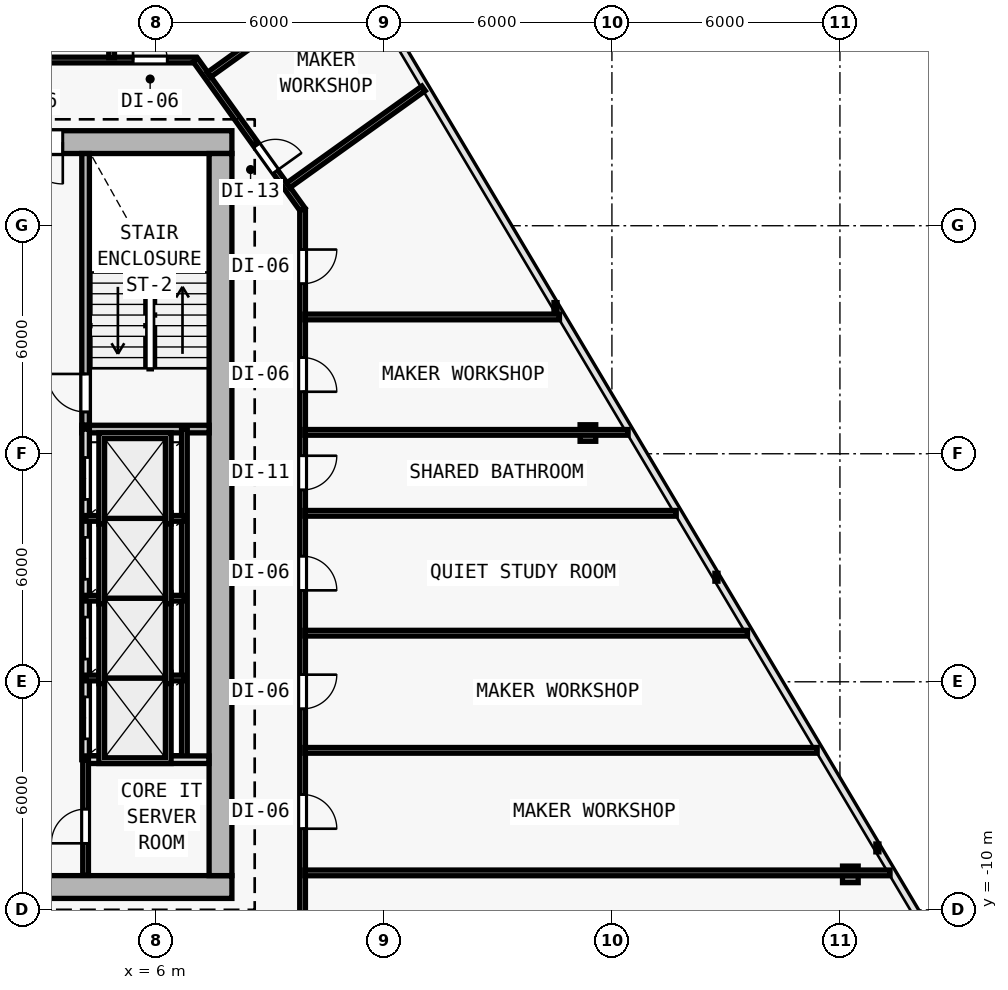
"""IFC4 building model, lengths in metres.
Left out: names, types, materials, properties, quantities, classifications, styles, units other than length and angle.
Written with IfcOpenShell. Run it as: python <this file> out.ifc"""

import sys

from ifc_helpers import new_model, si_unit, direction, frame, frame_2d, origin, origin_2d, place, context, subcontext, project, spatial, rectangle, i_section, extrude, element, fill, save


model = new_model("IFC4")
c1 = context("Model", 3, precision=1e-05, world=origin(), true_north=direction((0.0, 1.0)))
c2 = subcontext(c1, "Body", "Model", "MODEL_VIEW")
j1 = project(units=[si_unit("LENGTHUNIT", "METRE"), si_unit("PLANEANGLEUNIT", "RADIAN")], contexts=[c1])
p1 = place(None, origin())
s1 = spatial("IfcSite", under=j1, at=p1, CompositionType="ELEMENT")
p2 = place(p1, origin())
s2 = spatial("IfcBuilding", under=s1, at=p2, CompositionType="ELEMENT")
p3 = place(p2, frame((0.0, 0.0, 62.4)))
s3 = spatial("IfcBuildingStorey", under=s2, at=p3, CompositionType="ELEMENT", Elevation=62.4)
for number, where, z_axis, x_axis in (
    (1, (7.7, -9.4, 0.0), (0.0, 0.0, 1.0), (1.0, 0.0, 0.0)),
    (2, (7.7, 10.2, 0.0), (0.0, 0.0, 1.0), (1.0, 0.0, 0.0)),
    (3, (7.7, 0.4, 0.0), (0.0, 0.0, 1.0), (1.0, 0.0, 0.0)),
):
    element("IfcColumn", number, at=place(p3, frame(where, z_axis=z_axis, x_axis=x_axis)), inside=s3, PredefinedType="COLUMN", context=c2, shape_type="SweptSolid", body=[
        extrude(i_section(OverallWidth=0.416, OverallDepth=0.446, WebThickness=0.025, FlangeThickness=0.04, FilletRadius=0.015, at=origin_2d()), origin(), (0.0, 0.0, 1.0), 3.6),
    ])
p4 = place(p3, frame((24.274, -9.067, 0.006), z_axis=(-0.026039494941, 0.021620259507, 0.999427090428), x_axis=(-0.638800249892, -0.769372628015, 0.0)))
e4 = element("IfcColumn", 4, at=p4, inside=s3, PredefinedType="COLUMN", context=c2, shape_type="SweptSolid", body=[
    extrude(i_section(OverallWidth=0.412, OverallDepth=0.435, WebThickness=0.023, FlangeThickness=0.037, FilletRadius=0.015, at=origin_2d()), origin(), (0.0, 0.0, 1.0), 3.591),
])
p5 = place(p3, frame((17.368, 2.546, 0.006), z_axis=(-0.018907326549, 0.00952167524, 0.999775900241), x_axis=(-0.449781931574, -0.893138406984, 0.0)))
e5 = element("IfcColumn", 5, at=p5, inside=s3, PredefinedType="COLUMN", context=c2, shape_type="SweptSolid", body=[
    extrude(i_section(OverallWidth=0.412, OverallDepth=0.435, WebThickness=0.023, FlangeThickness=0.037, FilletRadius=0.015, at=origin_2d()), origin(), (0.0, 0.0, 1.0), 3.59),
])
p6 = place(p3, frame((-8.0, -9.4, 0.0), z_axis=(0.0, 0.0, 1.0), x_axis=(1.0, 0.0, 0.0)))
e6 = element("IfcWall", 6, at=p6, inside=s3, PredefinedType="SHEAR", context=c2, shape_type="SweptSolid", body=[
    extrude(rectangle(XDim=16.0, YDim=0.6, at=frame_2d((8.0, 0.0))), origin(), (0.0, 0.0, 1.0), 3.35),
])
p7 = place(p6, frame((9.65, 0.0, 0.0)))
e7 = element("IfcOpeningElement", 7, at=p7, cuts=e6, PredefinedType="OPENING", context=c2, shape_type="SweptSolid", body=[
    extrude(rectangle(XDim=1.5, YDim=2.2, at=frame_2d((0.75, 1.1))), frame((0.0, 0.31, 0.0), z_axis=(0.0, -1.0, 0.0), x_axis=(1.0, 0.0, 0.0)), (0.0, 0.0, 1.0), 0.62),
])
p8 = place(p3, frame((8.0, 10.2, 0.0), z_axis=(0.0, 0.0, 1.0), x_axis=(-1.0, 0.0, 0.0)))
e8 = element("IfcWall", 8, at=p8, inside=s3, PredefinedType="SHEAR", context=c2, shape_type="SweptSolid", body=[
    extrude(rectangle(XDim=16.0, YDim=0.6, at=frame_2d((8.0, 0.0))), origin(), (0.0, 0.0, 1.0), 3.35),
])
p9 = place(p8, frame((4.45, 0.0, 0.0)))
e9 = element("IfcOpeningElement", 9, at=p9, cuts=e8, PredefinedType="OPENING", context=c2, shape_type="SweptSolid", body=[
    extrude(rectangle(XDim=1.1, YDim=2.15, at=frame_2d((0.55, 1.075))), frame((0.0, 0.31, 0.0), z_axis=(0.0, -1.0, 0.0), x_axis=(1.0, 0.0, 0.0)), (0.0, 0.0, 1.0), 0.62),
])
p10 = place(p3, frame((7.7, 9.9, 0.0), z_axis=(0.0, 0.0, 1.0), x_axis=(0.0, -1.0, 0.0)))
e10 = element("IfcWall", 10, at=p10, inside=s3, PredefinedType="SHEAR", context=c2, shape_type="SweptSolid", body=[
    extrude(rectangle(XDim=19.0, YDim=0.6, at=frame_2d((9.5, 0.0))), origin(), (0.0, 0.0, 1.0), 3.35),
])
p11 = place(p3, frame((4.15, 2.75, 0.0), z_axis=(0.0, 0.0, 1.0), x_axis=(0.0, 1.0, 0.0)))
e11 = element("IfcWall", 11, at=p11, inside=s3, PredefinedType="SOLIDWALL", context=c2, shape_type="SweptSolid", body=[
    extrude(rectangle(XDim=7.15, YDim=0.2, at=frame_2d((3.575, 0.0))), origin(), (0.0, 0.0, 1.0), 3.35),
])
p12 = place(p11, frame((0.35, 0.0, 0.0)))
e12 = element("IfcOpeningElement", 12, at=p12, cuts=e11, PredefinedType="OPENING", context=c2, shape_type="SweptSolid", body=[
    extrude(rectangle(XDim=1.0, YDim=2.15, at=frame_2d((0.5, 1.075))), frame((0.0, 0.11, 0.0), z_axis=(0.0, -1.0, 0.0), x_axis=(1.0, 0.0, 0.0)), (0.0, 0.0, 1.0), 0.22),
])
p13 = place(p3, frame((4.05, 2.65, 0.0), z_axis=(0.0, 0.0, 1.0), x_axis=(1.0, 0.0, 0.0)))
e13 = element("IfcWall", 13, at=p13, inside=s3, PredefinedType="SOLIDWALL", context=c2, shape_type="SweptSolid", body=[
    extrude(rectangle(XDim=3.35, YDim=0.2, at=frame_2d((1.675, 0.0))), origin(), (0.0, 0.0, 1.0), 3.35),
])
p14 = place(p3, frame((4.15, -6.05, 0.0), z_axis=(0.0, 0.0, 1.0), x_axis=(0.0, 1.0, 0.0)))
e14 = element("IfcWall", 14, at=p14, inside=s3, PredefinedType="SOLIDWALL", context=c2, shape_type="SweptSolid", body=[
    extrude(rectangle(XDim=8.7, YDim=0.2, at=frame_2d((4.35, 0.0))), origin(), (0.0, 0.0, 1.0), 3.35),
])
p15 = place(p14, frame((0.55, 0.0, 0.0)))
e15 = element("IfcOpeningElement", 15, at=p15, cuts=e14, PredefinedType="OPENING", context=c2, shape_type="SweptSolid", body=[
    extrude(rectangle(XDim=1.1, YDim=2.15, at=frame_2d((0.55, 1.075))), frame((0.0, 0.11, 0.0), z_axis=(0.0, -1.0, 0.0), x_axis=(1.0, 0.0, 0.0)), (0.0, 0.0, 1.0), 0.22),
])
p16 = place(p14, frame((2.65, 0.0, 0.0)))
e16 = element("IfcOpeningElement", 16, at=p16, cuts=e14, PredefinedType="OPENING", context=c2, shape_type="SweptSolid", body=[
    extrude(rectangle(XDim=1.1, YDim=2.15, at=frame_2d((0.55, 1.075))), frame((0.0, 0.11, 0.0), z_axis=(0.0, -1.0, 0.0), x_axis=(1.0, 0.0, 0.0)), (0.0, 0.0, 1.0), 0.22),
])
p17 = place(p14, frame((4.75, 0.0, 0.0)))
e17 = element("IfcOpeningElement", 17, at=p17, cuts=e14, PredefinedType="OPENING", context=c2, shape_type="SweptSolid", body=[
    extrude(rectangle(XDim=1.1, YDim=2.15, at=frame_2d((0.55, 1.075))), frame((0.0, 0.11, 0.0), z_axis=(0.0, -1.0, 0.0), x_axis=(1.0, 0.0, 0.0)), (0.0, 0.0, 1.0), 0.22),
])
p18 = place(p14, frame((6.85, 0.0, 0.0)))
e18 = element("IfcOpeningElement", 18, at=p18, cuts=e14, PredefinedType="OPENING", context=c2, shape_type="SweptSolid", body=[
    extrude(rectangle(XDim=1.1, YDim=2.15, at=frame_2d((0.55, 1.075))), frame((0.0, 0.11, 0.0), z_axis=(0.0, -1.0, 0.0), x_axis=(1.0, 0.0, 0.0)), (0.0, 0.0, 1.0), 0.22),
])
p19 = place(p3, frame((6.75, -6.05, 0.0), z_axis=(0.0, 0.0, 1.0), x_axis=(0.0, 1.0, 0.0)))
e19 = element("IfcWall", 19, at=p19, inside=s3, PredefinedType="PARTITIONING", context=c2, shape_type="SweptSolid", body=[
    extrude(rectangle(XDim=8.7, YDim=0.15, at=frame_2d((4.35, 0.0))), origin(), (0.0, 0.0, 1.0), 3.35),
])
for number, where, z_axis, x_axis in (
    (20, (4.15, -3.9, 0.0), (0.0, 0.0, 1.0), (1.0, 0.0, 0.0)),
    (21, (4.15, -1.8, 0.0), (0.0, 0.0, 1.0), (1.0, 0.0, 0.0)),
    (22, (4.15, 0.3, 0.0), (0.0, 0.0, 1.0), (1.0, 0.0, 0.0)),
):
    element("IfcWall", number, at=place(p3, frame(where, z_axis=z_axis, x_axis=x_axis)), inside=s3, PredefinedType="PARTITIONING", context=c2, shape_type="SweptSolid", body=[
        extrude(rectangle(XDim=2.6, YDim=0.15, at=frame_2d((1.3, 0.0))), origin(), (0.0, 0.0, 1.0), 3.35),
    ])
p20 = place(p3, frame((4.15, -6.05, 0.0), z_axis=(0.0, 0.0, 1.0), x_axis=(1.0, 0.0, 0.0)))
e23 = element("IfcWall", 23, at=p20, inside=s3, PredefinedType="SOLIDWALL", context=c2, shape_type="SweptSolid", body=[
    extrude(rectangle(XDim=3.245, YDim=0.2, at=frame_2d((1.623, 0.0))), origin(), (0.0, 0.0, 1.0), 3.35),
])
p21 = place(p3, frame((4.15, -9.095, 0.0), z_axis=(0.0, 0.0, 1.0), x_axis=(0.0, 1.0, 0.0)))
e24 = element("IfcWall", 24, at=p21, inside=s3, PredefinedType="PARTITIONING", context=c2, shape_type="SweptSolid", body=[
    extrude(rectangle(XDim=3.045, YDim=0.15, at=frame_2d((1.522, 0.0))), origin(), (0.0, 0.0, 1.0), 3.35),
])
p22 = place(p21, frame((0.845, 0.0, 0.0)))
e25 = element("IfcOpeningElement", 25, at=p22, cuts=e24, PredefinedType="OPENING", context=c2, shape_type="SweptSolid", body=[
    extrude(rectangle(XDim=0.9, YDim=2.1, at=frame_2d((0.45, 1.05))), frame((0.0, 0.085, 0.0), z_axis=(0.0, -1.0, 0.0), x_axis=(1.0, 0.0, 0.0)), (0.0, 0.0, 1.0), 0.17),
])
p23 = place(p3, frame((-7.041, 12.36, 0.0), z_axis=(0.0, 0.0, 1.0), x_axis=(1.0, 0.0, 0.0)))
e26 = element("IfcWall", 26, at=p23, inside=s3, PredefinedType="PARTITIONING", context=c2, shape_type="SweptSolid", body=[
    extrude(rectangle(XDim=14.082, YDim=0.15, at=frame_2d((7.041, 0.0))), origin(), (0.0, 0.0, 1.0), 3.35),
])
p24 = place(p23, frame((12.44, 0.0, 0.0)))
e27 = element("IfcOpeningElement", 27, at=p24, cuts=e26, PredefinedType="OPENING", context=c2, shape_type="SweptSolid", body=[
    extrude(rectangle(XDim=0.9, YDim=2.1, at=frame_2d((0.45, 1.05))), frame((0.0, 0.085, 0.0), z_axis=(0.0, -1.0, 0.0), x_axis=(1.0, 0.0, 0.0)), (0.0, 0.0, 1.0), 0.17),
])
p25 = place(p23, frame((9.225, 0.0, 0.0)))
e28 = element("IfcOpeningElement", 28, at=p25, cuts=e26, PredefinedType="OPENING", context=c2, shape_type="SweptSolid", body=[
    extrude(rectangle(XDim=0.9, YDim=2.1, at=frame_2d((0.45, 1.05))), frame((0.0, 0.085, 0.0), z_axis=(0.0, -1.0, 0.0), x_axis=(1.0, 0.0, 0.0)), (0.0, 0.0, 1.0), 0.17),
])
p26 = place(p23, frame((4.866, 0.0, 0.0)))
e29 = element("IfcOpeningElement", 29, at=p26, cuts=e26, PredefinedType="OPENING", context=c2, shape_type="SweptSolid", body=[
    extrude(rectangle(XDim=0.9, YDim=2.1, at=frame_2d((0.45, 1.05))), frame((0.0, 0.085, 0.0), z_axis=(0.0, -1.0, 0.0), x_axis=(1.0, 0.0, 0.0)), (0.0, 0.0, 1.0), 0.17),
])
p27 = place(p23, frame((1.218, 0.0, 0.0)))
e30 = element("IfcOpeningElement", 30, at=p27, cuts=e26, PredefinedType="OPENING", context=c2, shape_type="SweptSolid", body=[
    extrude(rectangle(XDim=0.9, YDim=2.1, at=frame_2d((0.45, 1.05))), frame((0.0, 0.085, 0.0), z_axis=(0.0, -1.0, 0.0), x_axis=(1.0, 0.0, 0.0)), (0.0, 0.0, 1.0), 0.17),
])
p28 = place(p3, frame((7.041, 12.36, 0.0), z_axis=(0.0, 0.0, 1.0), x_axis=(0.582449511476, -0.812866881218, 0.0)))
e31 = element("IfcWall", 31, at=p28, inside=s3, PredefinedType="PARTITIONING", context=c2, shape_type="SweptSolid", body=[
    extrude(rectangle(XDim=4.84, YDim=0.15, at=frame_2d((2.42, 0.0))), origin(), (0.0, 0.0, 1.0), 2.725),
])
p29 = place(p28, frame((2.763, 0.0, 0.0)))
e32 = element("IfcOpeningElement", 32, at=p29, cuts=e31, PredefinedType="OPENING", context=c2, shape_type="SweptSolid", body=[
    extrude(rectangle(XDim=0.85, YDim=2.1, at=frame_2d((0.425, 1.05))), frame((0.0, 0.085, 0.0), z_axis=(0.0, -1.0, 0.0), x_axis=(1.0, 0.0, 0.0)), (0.0, 0.0, 1.0), 0.17),
])
p30 = place(p3, frame((9.86, 8.426, 0.0), z_axis=(0.0, 0.0, 1.0), x_axis=(0.0, -1.0, 0.0)))
e33 = element("IfcWall", 33, at=p30, inside=s3, PredefinedType="PARTITIONING", context=c2, shape_type="SweptSolid", body=[
    extrude(rectangle(XDim=19.986, YDim=0.15, at=frame_2d((9.993, 0.0))), origin(), (0.0, 0.0, 1.0), 2.609),
])
p31 = place(p30, frame((15.392, 0.0, 0.0)))
e34 = element("IfcOpeningElement", 34, at=p31, cuts=e33, PredefinedType="OPENING", context=c2, shape_type="SweptSolid", body=[
    extrude(rectangle(XDim=0.9, YDim=2.1, at=frame_2d((0.45, 1.05))), frame((0.0, 0.085, 0.0), z_axis=(0.0, -1.0, 0.0), x_axis=(1.0, 0.0, 0.0)), (0.0, 0.0, 1.0), 0.17),
])
p32 = place(p30, frame((12.238, 0.0, 0.0)))
e35 = element("IfcOpeningElement", 35, at=p32, cuts=e33, PredefinedType="OPENING", context=c2, shape_type="SweptSolid", body=[
    extrude(rectangle(XDim=0.9, YDim=2.1, at=frame_2d((0.45, 1.05))), frame((0.0, 0.085, 0.0), z_axis=(0.0, -1.0, 0.0), x_axis=(1.0, 0.0, 0.0)), (0.0, 0.0, 1.0), 0.17),
])
p33 = place(p30, frame((9.12, 0.0, 0.0)))
e36 = element("IfcOpeningElement", 36, at=p33, cuts=e33, PredefinedType="OPENING", context=c2, shape_type="SweptSolid", body=[
    extrude(rectangle(XDim=0.9, YDim=2.1, at=frame_2d((0.45, 1.05))), frame((0.0, 0.085, 0.0), z_axis=(0.0, -1.0, 0.0), x_axis=(1.0, 0.0, 0.0)), (0.0, 0.0, 1.0), 0.17),
])
p34 = place(p30, frame((6.478, 0.0, 0.0)))
e37 = element("IfcOpeningElement", 37, at=p34, cuts=e33, PredefinedType="OPENING", context=c2, shape_type="SweptSolid", body=[
    extrude(rectangle(XDim=0.9, YDim=2.1, at=frame_2d((0.45, 1.05))), frame((0.0, 0.085, 0.0), z_axis=(0.0, -1.0, 0.0), x_axis=(1.0, 0.0, 0.0)), (0.0, 0.0, 1.0), 0.17),
])
p35 = place(p30, frame((3.894, 0.0, 0.0)))
e38 = element("IfcOpeningElement", 38, at=p35, cuts=e33, PredefinedType="OPENING", context=c2, shape_type="SweptSolid", body=[
    extrude(rectangle(XDim=0.9, YDim=2.1, at=frame_2d((0.45, 1.05))), frame((0.0, 0.085, 0.0), z_axis=(0.0, -1.0, 0.0), x_axis=(1.0, 0.0, 0.0)), (0.0, 0.0, 1.0), 0.17),
])
p36 = place(p30, frame((1.052, 0.0, 0.0)))
e39 = element("IfcOpeningElement", 39, at=p36, cuts=e33, PredefinedType="OPENING", context=c2, shape_type="SweptSolid", body=[
    extrude(rectangle(XDim=0.9, YDim=2.1, at=frame_2d((0.45, 1.05))), frame((0.0, 0.085, 0.0), z_axis=(0.0, -1.0, 0.0), x_axis=(1.0, 0.0, 0.0)), (0.0, 0.0, 1.0), 0.17),
])
p37 = place(p3, frame((9.92, -9.028, 0.0), z_axis=(0.0, 0.0, 1.0), x_axis=(1.0, 0.0, 0.0)))
e40 = element("IfcWall", 40, at=p37, inside=s3, PredefinedType="PARTITIONING", context=c2, shape_type="SweptSolid", body=[
    extrude(rectangle(XDim=15.398, YDim=0.15, at=frame_2d((7.699, 0.0))), origin(), (0.0, 0.0, 1.0), 2.609),
])
p38 = place(p3, frame((9.92, 2.563, 0.0), z_axis=(0.0, 0.0, 1.0), x_axis=(1.0, 0.0, 0.0)))
e41 = element("IfcWall", 41, at=p38, inside=s3, PredefinedType="PARTITIONING", context=c2, shape_type="SweptSolid", body=[
    extrude(rectangle(XDim=8.506, YDim=0.15, at=frame_2d((4.253, 0.0))), origin(), (0.0, 0.0, 1.0), 2.735),
])
p39 = place(p3, frame((7.394, 11.971, 0.0), z_axis=(0.0, 0.0, 1.0), x_axis=(0.81290624287, 0.58239457441, 0.0)))
e42 = element("IfcWall", 42, at=p39, inside=s3, PredefinedType="PARTITIONING", context=c2, shape_type="SweptSolid", body=[
    extrude(rectangle(XDim=4.691, YDim=0.15, at=frame_2d((2.345, 0.0))), origin(), (0.0, 0.0, 1.0), 2.725),
])
p40 = place(p3, frame((9.92, -2.721, 0.0), z_axis=(0.0, 0.0, 1.0), x_axis=(1.0, 0.0, 0.0)))
e43 = element("IfcWall", 43, at=p40, inside=s3, PredefinedType="PARTITIONING", context=c2, shape_type="SweptSolid", body=[
    extrude(rectangle(XDim=11.647, YDim=0.15, at=frame_2d((5.824, 0.0))), origin(), (0.0, 0.0, 1.0), 2.735),
])
p41 = place(p3, frame((9.48, 9.059, 0.0), z_axis=(0.0, 0.0, 1.0), x_axis=(0.812904993981, 0.582396317606, 0.0)))
e44 = element("IfcWall", 44, at=p41, inside=s3, PredefinedType="PARTITIONING", context=c2, shape_type="SweptSolid", body=[
    extrude(rectangle(XDim=4.385, YDim=0.15, at=frame_2d((2.192, 0.0))), origin(), (0.0, 0.0, 1.0), 2.735),
])
p42 = place(p3, frame((9.92, -5.804, 0.0), z_axis=(0.0, 0.0, 1.0), x_axis=(1.0, 0.0, 0.0)))
e45 = element("IfcWall", 45, at=p42, inside=s3, PredefinedType="PARTITIONING", context=c2, shape_type="SweptSolid", body=[
    extrude(rectangle(XDim=13.48, YDim=0.15, at=frame_2d((6.74, 0.0))), origin(), (0.0, 0.0, 1.0), 2.735),
])
p43 = place(p3, frame((9.92, 0.433, 0.0), z_axis=(0.0, 0.0, 1.0), x_axis=(1.0, 0.0, 0.0)))
e46 = element("IfcWall", 46, at=p43, inside=s3, PredefinedType="PARTITIONING", context=c2, shape_type="SweptSolid", body=[
    extrude(rectangle(XDim=9.772, YDim=0.15, at=frame_2d((4.886, 0.0))), origin(), (0.0, 0.0, 1.0), 2.735),
])
p44 = place(p3, frame((9.92, 5.6, 0.0), z_axis=(0.0, 0.0, 1.0), x_axis=(1.0, 0.0, 0.0)))
e47 = element("IfcWall", 47, at=p44, inside=s3, PredefinedType="PARTITIONING", context=c2, shape_type="SweptSolid", body=[
    extrude(rectangle(XDim=6.7, YDim=0.15, at=frame_2d((3.35, 0.0))), origin(), (0.0, 0.0, 1.0), 2.735),
])
p45 = place(p3, frame((4.835, 12.42, 0.0), z_axis=(0.0, 0.0, 1.0), x_axis=(0.0, 1.0, 0.0)))
e48 = element("IfcWall", 48, at=p45, inside=s3, PredefinedType="PARTITIONING", context=c2, shape_type="SweptSolid", body=[
    extrude(rectangle(XDim=9.775, YDim=0.15, at=frame_2d((4.888, 0.0))), origin(), (0.0, 0.0, 1.0), 2.735),
])
p46 = place(p9, origin())
e49 = element("IfcDoor", 49, at=p46, inside=s3, OperationType="SINGLE_SWING_LEFT", PredefinedType="DOOR", context=c2, shape_type="SweptSolid", body=[
    extrude(rectangle(XDim=1.1, YDim=2.15, at=frame_2d((0.55, 1.075))), frame((0.0, 0.025, 0.0), z_axis=(0.0, -1.0, 0.0), x_axis=(1.0, 0.0, 0.0)), (0.0, 0.0, 1.0), 0.05),
])
fill(e9, e49)
p47 = place(p12, origin())
e50 = element("IfcDoor", 50, at=p47, inside=s3, OperationType="SINGLE_SWING_RIGHT", PredefinedType="DOOR", context=c2, shape_type="SweptSolid", body=[
    extrude(rectangle(XDim=1.0, YDim=2.15, at=frame_2d((0.5, 1.075))), frame((0.0, 0.025, 0.0), z_axis=(0.0, -1.0, 0.0), x_axis=(1.0, 0.0, 0.0)), (0.0, 0.0, 1.0), 0.05),
])
fill(e12, e50)
p48 = place(p15, origin())
e51 = element("IfcDoor", 51, at=p48, inside=s3, OperationType="DOUBLE_DOOR_SLIDING", PredefinedType="DOOR", context=c2, shape_type="SweptSolid", body=[
    extrude(rectangle(XDim=1.1, YDim=2.15, at=frame_2d((0.55, 1.075))), frame((0.0, 0.025, 0.0), z_axis=(0.0, -1.0, 0.0), x_axis=(1.0, 0.0, 0.0)), (0.0, 0.0, 1.0), 0.05),
])
fill(e15, e51)
p49 = place(p16, origin())
e52 = element("IfcDoor", 52, at=p49, inside=s3, OperationType="DOUBLE_DOOR_SLIDING", PredefinedType="DOOR", context=c2, shape_type="SweptSolid", body=[
    extrude(rectangle(XDim=1.1, YDim=2.15, at=frame_2d((0.55, 1.075))), frame((0.0, 0.025, 0.0), z_axis=(0.0, -1.0, 0.0), x_axis=(1.0, 0.0, 0.0)), (0.0, 0.0, 1.0), 0.05),
])
fill(e16, e52)
p50 = place(p17, origin())
e53 = element("IfcDoor", 53, at=p50, inside=s3, OperationType="DOUBLE_DOOR_SLIDING", PredefinedType="DOOR", context=c2, shape_type="SweptSolid", body=[
    extrude(rectangle(XDim=1.1, YDim=2.15, at=frame_2d((0.55, 1.075))), frame((0.0, 0.025, 0.0), z_axis=(0.0, -1.0, 0.0), x_axis=(1.0, 0.0, 0.0)), (0.0, 0.0, 1.0), 0.05),
])
fill(e17, e53)
p51 = place(p18, origin())
e54 = element("IfcDoor", 54, at=p51, inside=s3, OperationType="DOUBLE_DOOR_SLIDING", PredefinedType="DOOR", context=c2, shape_type="SweptSolid", body=[
    extrude(rectangle(XDim=1.1, YDim=2.15, at=frame_2d((0.55, 1.075))), frame((0.0, 0.025, 0.0), z_axis=(0.0, -1.0, 0.0), x_axis=(1.0, 0.0, 0.0)), (0.0, 0.0, 1.0), 0.05),
])
fill(e18, e54)
p52 = place(p22, origin())
e55 = element("IfcDoor", 55, at=p52, inside=s3, OperationType="SINGLE_SWING_LEFT", PredefinedType="DOOR", context=c2, shape_type="SweptSolid", body=[
    extrude(rectangle(XDim=0.9, YDim=2.1, at=frame_2d((0.45, 1.05))), frame((0.0, 0.025, 0.0), z_axis=(0.0, -1.0, 0.0), x_axis=(1.0, 0.0, 0.0)), (0.0, 0.0, 1.0), 0.05),
])
fill(e25, e55)
p53 = place(p31, origin())
e56 = element("IfcDoor", 56, at=p53, inside=s3, OperationType="SINGLE_SWING_RIGHT", PredefinedType="DOOR", context=c2, shape_type="SweptSolid", body=[
    extrude(rectangle(XDim=0.9, YDim=2.1, at=frame_2d((0.45, 1.05))), frame((0.0, 0.025, 0.0), z_axis=(0.0, -1.0, 0.0), x_axis=(1.0, 0.0, 0.0)), (0.0, 0.0, 1.0), 0.05),
])
fill(e34, e56)
p54 = place(p32, origin())
e57 = element("IfcDoor", 57, at=p54, inside=s3, OperationType="SINGLE_SWING_LEFT", PredefinedType="DOOR", context=c2, shape_type="SweptSolid", body=[
    extrude(rectangle(XDim=0.9, YDim=2.1, at=frame_2d((0.45, 1.05))), frame((0.0, 0.025, 0.0), z_axis=(0.0, -1.0, 0.0), x_axis=(1.0, 0.0, 0.0)), (0.0, 0.0, 1.0), 0.05),
])
fill(e35, e57)
p55 = place(p33, origin())
e58 = element("IfcDoor", 58, at=p55, inside=s3, OperationType="SINGLE_SWING_RIGHT", PredefinedType="DOOR", context=c2, shape_type="SweptSolid", body=[
    extrude(rectangle(XDim=0.9, YDim=2.1, at=frame_2d((0.45, 1.05))), frame((0.0, 0.025, 0.0), z_axis=(0.0, -1.0, 0.0), x_axis=(1.0, 0.0, 0.0)), (0.0, 0.0, 1.0), 0.05),
])
fill(e36, e58)
p56 = place(p34, origin())
e59 = element("IfcDoor", 59, at=p56, inside=s3, OperationType="SINGLE_SWING_LEFT", PredefinedType="DOOR", context=c2, shape_type="SweptSolid", body=[
    extrude(rectangle(XDim=0.9, YDim=2.1, at=frame_2d((0.45, 1.05))), frame((0.0, 0.025, 0.0), z_axis=(0.0, -1.0, 0.0), x_axis=(1.0, 0.0, 0.0)), (0.0, 0.0, 1.0), 0.05),
])
fill(e37, e59)
p57 = place(p35, origin())
e60 = element("IfcDoor", 60, at=p57, inside=s3, OperationType="SINGLE_SWING_RIGHT", PredefinedType="DOOR", context=c2, shape_type="SweptSolid", body=[
    extrude(rectangle(XDim=0.9, YDim=2.1, at=frame_2d((0.45, 1.05))), frame((0.0, 0.025, 0.0), z_axis=(0.0, -1.0, 0.0), x_axis=(1.0, 0.0, 0.0)), (0.0, 0.0, 1.0), 0.05),
])
fill(e38, e60)
p58 = place(p36, origin())
e61 = element("IfcDoor", 61, at=p58, inside=s3, OperationType="SINGLE_SWING_LEFT", PredefinedType="DOOR", context=c2, shape_type="SweptSolid", body=[
    extrude(rectangle(XDim=0.9, YDim=2.1, at=frame_2d((0.45, 1.05))), frame((0.0, 0.025, 0.0), z_axis=(0.0, -1.0, 0.0), x_axis=(1.0, 0.0, 0.0)), (0.0, 0.0, 1.0), 0.05),
])
fill(e39, e61)
p59 = place(p29, origin())
e62 = element("IfcDoor", 62, at=p59, inside=s3, OperationType="SINGLE_SWING_RIGHT", PredefinedType="DOOR", context=c2, shape_type="SweptSolid", body=[
    extrude(rectangle(XDim=0.85, YDim=2.1, at=frame_2d((0.425, 1.05))), frame((0.0, 0.025, 0.0), z_axis=(0.0, -1.0, 0.0), x_axis=(1.0, 0.0, 0.0)), (0.0, 0.0, 1.0), 0.05),
])
fill(e32, e62)
p60 = place(p24, origin())
e63 = element("IfcDoor", 63, at=p60, inside=s3, OperationType="SINGLE_SWING_LEFT", PredefinedType="DOOR", context=c2, shape_type="SweptSolid", body=[
    extrude(rectangle(XDim=0.9, YDim=2.1, at=frame_2d((0.45, 1.05))), frame((0.0, 0.025, 0.0), z_axis=(0.0, -1.0, 0.0), x_axis=(1.0, 0.0, 0.0)), (0.0, 0.0, 1.0), 0.05),
])
fill(e27, e63)
save(model, sys.argv[1])
